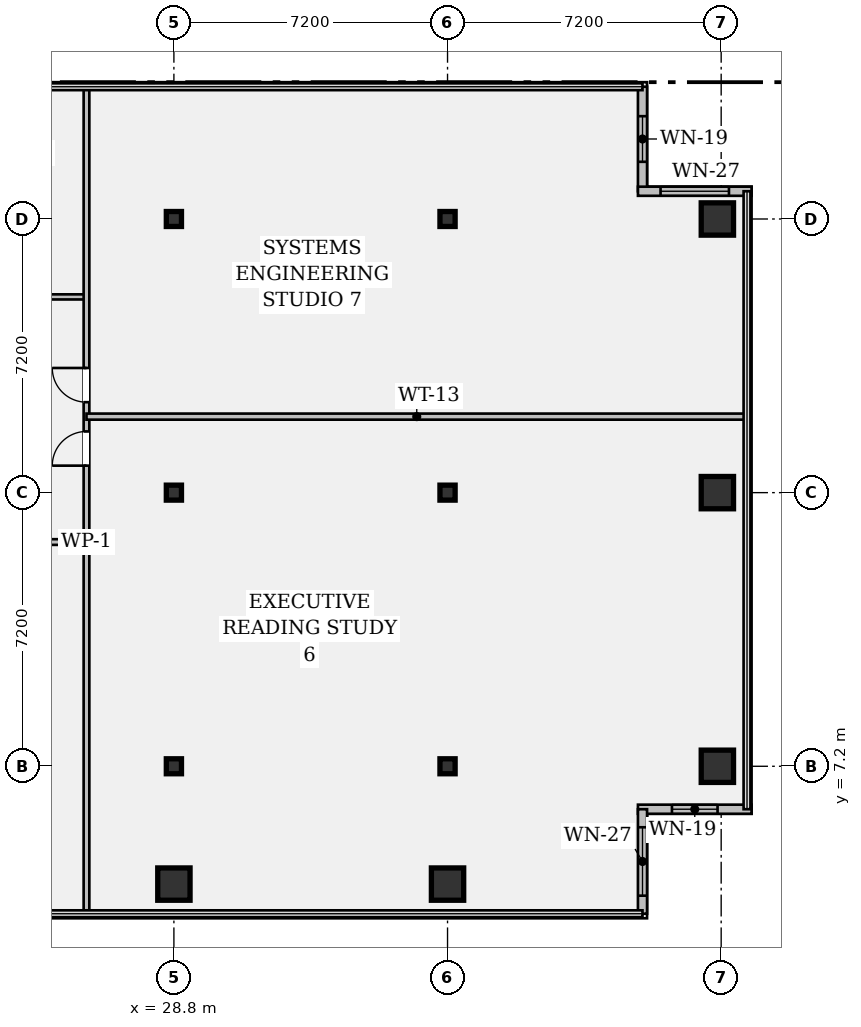
"""IFC4 building model, lengths in metres.
Left out: names, types, materials, properties, quantities, classifications, styles, units other than length and angle.
Written with IfcOpenShell. Run it as: python <this file> out.ifc"""

import sys

from ifc_helpers import new_model, si_unit, direction, frame, frame_2d, origin, origin_2d, place, context, subcontext, project, spatial, rectangle, hollow_rectangle, i_section, extrude, element, fill, save


model = new_model("IFC4")
c1 = context("Model", 3, precision=1e-05, world=origin(), true_north=direction((0.0, 1.0)))
c2 = subcontext(c1, "Body", "Model", "MODEL_VIEW")
j1 = project(units=[si_unit("LENGTHUNIT", "METRE"), si_unit("PLANEANGLEUNIT", "RADIAN")], contexts=[c1])
p1 = place(None, origin())
s1 = spatial("IfcSite", under=j1, at=p1, CompositionType="ELEMENT")
p2 = place(p1, origin())
s2 = spatial("IfcBuilding", under=s1, at=p2, CompositionType="ELEMENT")
p3 = place(p2, frame((0.0, 0.0, 176.75)))
s3 = spatial("IfcBuildingStorey", under=s2, at=p3, CompositionType="ELEMENT", Elevation=176.75)
p4 = place(p3, frame((28.8, 4.1, 0.0), z_axis=(0.0, 0.0, 1.0), x_axis=(1.0, 0.0, 0.0)))
e1 = element("IfcColumn", 1, at=p4, inside=s3, PredefinedType="COLUMN", context=c2, shape_type="SweptSolid", body=[
    extrude(hollow_rectangle(XDim=0.85, YDim=0.85, WallThickness=0.05, at=origin_2d()), origin(), (0.0, 0.0, 1.0), 3.24),
])
for number, where, z_axis, x_axis in (
    (2, (28.8, 7.2, 0.0), (0.0, 0.0, 1.0), (1.0, 0.0, 0.0)),
    (3, (28.8, 14.4, 0.0), (0.0, 0.0, 1.0), (1.0, 0.0, 0.0)),
    (4, (28.8, 21.6, 0.0), (0.0, 0.0, 1.0), (1.0, 0.0, 0.0)),
):
    element("IfcColumn", number, at=place(p3, frame(where, z_axis=z_axis, x_axis=x_axis)), inside=s3, PredefinedType="COLUMN", context=c2, shape_type="SweptSolid", body=[
        extrude(i_section(OverallWidth=0.399, OverallDepth=0.394, WebThickness=0.023, FlangeThickness=0.037, FilletRadius=0.018, at=origin_2d()), origin(), (0.0, 0.0, 1.0), 3.24),
    ])
p5 = place(p3, frame((36.0, 4.1, 0.0), z_axis=(0.0, 0.0, 1.0), x_axis=(1.0, 0.0, 0.0)))
e5 = element("IfcColumn", 5, at=p5, inside=s3, PredefinedType="COLUMN", context=c2, shape_type="SweptSolid", body=[
    extrude(hollow_rectangle(XDim=0.85, YDim=0.85, WallThickness=0.05, at=origin_2d()), origin(), (0.0, 0.0, 1.0), 3.24),
])
for number, where, z_axis, x_axis in (
    (6, (36.0, 7.2, 0.0), (0.0, 0.0, 1.0), (1.0, 0.0, 0.0)),
    (7, (36.0, 14.4, 0.0), (0.0, 0.0, 1.0), (1.0, 0.0, 0.0)),
    (8, (36.0, 21.6, 0.0), (0.0, 0.0, 1.0), (1.0, 0.0, 0.0)),
):
    element("IfcColumn", number, at=place(p3, frame(where, z_axis=z_axis, x_axis=x_axis)), inside=s3, PredefinedType="COLUMN", context=c2, shape_type="SweptSolid", body=[
        extrude(i_section(OverallWidth=0.399, OverallDepth=0.394, WebThickness=0.023, FlangeThickness=0.037, FilletRadius=0.018, at=origin_2d()), origin(), (0.0, 0.0, 1.0), 3.24),
    ])
for number, where, z_axis, x_axis in (
    (9, (43.1, 7.2, 0.0), (0.0, 0.0, 1.0), (1.0, 0.0, 0.0)),
    (10, (43.1, 14.4, 0.0), (0.0, 0.0, 1.0), (1.0, 0.0, 0.0)),
    (11, (43.1, 21.6, 0.0), (0.0, 0.0, 1.0), (1.0, 0.0, 0.0)),
):
    element("IfcColumn", number, at=place(p3, frame(where, z_axis=z_axis, x_axis=x_axis)), inside=s3, PredefinedType="COLUMN", context=c2, shape_type="SweptSolid", body=[
        extrude(hollow_rectangle(XDim=0.85, YDim=0.85, WallThickness=0.05, at=origin_2d()), origin(), (0.0, 0.0, 1.0), 3.24),
    ])
p6 = place(p3, frame((41.13, 25.08, 0.0), z_axis=(0.0, 0.0, 1.0), x_axis=(0.0, -1.0, 0.0)))
e12 = element("IfcWall", 12, at=p6, inside=s3, PredefinedType="STANDARD", context=c2, shape_type="SweptSolid", body=[
    extrude(rectangle(XDim=2.75, YDim=0.24, at=frame_2d((1.375, 0.0))), origin(), (0.0, 0.0, 1.0), 3.24),
])
p7 = place(p6, frame((0.775, 0.0, 0.95)))
e13 = element("IfcOpeningElement", 13, at=p7, cuts=e12, PredefinedType="OPENING", context=c2, shape_type="SweptSolid", body=[
    extrude(rectangle(XDim=1.2, YDim=1.8, at=frame_2d((0.6, 0.9))), frame((0.0, 0.132, 0.0), z_axis=(0.0, -1.0, 0.0), x_axis=(1.0, 0.0, 0.0)), (0.0, 0.0, 1.0), 0.264),
])
p8 = place(p3, frame((41.01, 22.33, 0.0), z_axis=(0.0, 0.0, 1.0), x_axis=(1.0, 0.0, 0.0)))
e14 = element("IfcWall", 14, at=p8, inside=s3, PredefinedType="STANDARD", context=c2, shape_type="SweptSolid", body=[
    extrude(rectangle(XDim=2.99, YDim=0.24, at=frame_2d((1.495, 0.0))), origin(), (0.0, 0.0, 1.0), 3.24),
])
p9 = place(p8, frame((0.595, 0.0, 0.95)))
e15 = element("IfcOpeningElement", 15, at=p9, cuts=e14, PredefinedType="OPENING", context=c2, shape_type="SweptSolid", body=[
    extrude(rectangle(XDim=1.8, YDim=1.35, at=frame_2d((0.9, 0.675))), frame((0.0, 0.132, 0.0), z_axis=(0.0, -1.0, 0.0), x_axis=(1.0, 0.0, 0.0)), (0.0, 0.0, 1.0), 0.264),
])
p10 = place(p3, frame((44.0, 6.07, 0.0), z_axis=(0.0, 0.0, 1.0), x_axis=(-1.0, 0.0, 0.0)))
e16 = element("IfcWall", 16, at=p10, inside=s3, PredefinedType="STANDARD", context=c2, shape_type="SweptSolid", body=[
    extrude(rectangle(XDim=2.99, YDim=0.24, at=frame_2d((1.495, 0.0))), origin(), (0.0, 0.0, 1.0), 3.24),
])
p11 = place(p10, frame((0.895, 0.0, 0.95)))
e17 = element("IfcOpeningElement", 17, at=p11, cuts=e16, PredefinedType="OPENING", context=c2, shape_type="SweptSolid", body=[
    extrude(rectangle(XDim=1.2, YDim=1.8, at=frame_2d((0.6, 0.9))), frame((0.0, 0.132, 0.0), z_axis=(0.0, -1.0, 0.0), x_axis=(1.0, 0.0, 0.0)), (0.0, 0.0, 1.0), 0.264),
])
p12 = place(p3, frame((41.13, 6.07, 0.0), z_axis=(0.0, 0.0, 1.0), x_axis=(0.0, -1.0, 0.0)))
e18 = element("IfcWall", 18, at=p12, inside=s3, PredefinedType="STANDARD", context=c2, shape_type="SweptSolid", body=[
    extrude(rectangle(XDim=2.75, YDim=0.24, at=frame_2d((1.375, 0.0))), origin(), (0.0, 0.0, 1.0), 3.24),
])
p13 = place(p12, frame((0.475, 0.0, 0.95)))
e19 = element("IfcOpeningElement", 19, at=p13, cuts=e18, PredefinedType="OPENING", context=c2, shape_type="SweptSolid", body=[
    extrude(rectangle(XDim=1.8, YDim=1.35, at=frame_2d((0.9, 0.675))), frame((0.0, 0.132, 0.0), z_axis=(0.0, -1.0, 0.0), x_axis=(1.0, 0.0, 0.0)), (0.0, 0.0, 1.0), 0.264),
])
p14 = place(p3, frame((24.55, 13.1, 0.0), z_axis=(0.0, 0.0, 1.0), x_axis=(1.0, 0.0, 0.0)))
e20 = element("IfcWall", 20, at=p14, inside=s3, PredefinedType="PARTITIONING", context=c2, shape_type="SweptSolid", body=[
    extrude(rectangle(XDim=1.95, YDim=0.15, at=frame_2d((0.975, 0.0))), origin(), (0.0, 0.0, 1.0), 2.808),
])
p15 = place(p3, frame((24.55, 19.55, 0.0), z_axis=(0.0, 0.0, 1.0), x_axis=(1.0, 0.0, 0.0)))
e21 = element("IfcWall", 21, at=p15, inside=s3, PredefinedType="PARTITIONING", context=c2, shape_type="SweptSolid", body=[
    extrude(rectangle(XDim=1.95, YDim=0.135, at=frame_2d((0.975, 0.0))), origin(), (0.0, 0.0, 1.0), 2.808),
])
p16 = place(p3, frame((26.5, 3.32, 0.0), z_axis=(0.0, 0.0, 1.0), x_axis=(0.0, 1.0, 0.0)))
e22 = element("IfcWall", 22, at=p16, inside=s3, PredefinedType="PARTITIONING", context=c2, shape_type="SweptSolid", body=[
    extrude(rectangle(XDim=21.76, YDim=0.15, at=frame_2d((10.88, 0.0))), origin(), (0.0, 0.0, 1.0), 2.603),
])
p17 = place(p16, frame((11.79, 0.0, 0.0)))
e23 = element("IfcOpeningElement", 23, at=p17, cuts=e22, PredefinedType="OPENING", context=c2, shape_type="SweptSolid", body=[
    extrude(rectangle(XDim=0.9, YDim=2.15, at=frame_2d((0.45, 1.075))), frame((0.0, 0.087, 0.0), z_axis=(0.0, -1.0, 0.0), x_axis=(1.0, 0.0, 0.0)), (0.0, 0.0, 1.0), 0.174),
])
p18 = place(p16, frame((13.46, 0.0, 0.0)))
e24 = element("IfcOpeningElement", 24, at=p18, cuts=e22, PredefinedType="OPENING", context=c2, shape_type="SweptSolid", body=[
    extrude(rectangle(XDim=0.9, YDim=2.15, at=frame_2d((0.45, 1.075))), frame((0.0, 0.087, 0.0), z_axis=(0.0, -1.0, 0.0), x_axis=(1.0, 0.0, 0.0)), (0.0, 0.0, 1.0), 0.174),
])
p19 = place(p3, frame((26.5, 16.4, 0.0), z_axis=(0.0, 0.0, 1.0), x_axis=(1.0, 0.0, 0.0)))
e25 = element("IfcWall", 25, at=p19, inside=s3, PredefinedType="PARTITIONING", context=c2, shape_type="SweptSolid", body=[
    extrude(rectangle(XDim=17.38, YDim=0.16, at=frame_2d((8.69, 0.0))), origin(), (0.0, 0.0, 1.0), 2.603),
])
p20 = place(p7, origin())
e26 = element("IfcWindow", 26, at=p20, inside=s3, PartitioningType="SINGLE_PANEL", PredefinedType="WINDOW", context=c2, shape_type="SweptSolid", body=[
    extrude(rectangle(XDim=1.2, YDim=1.8, at=frame_2d((0.6, 0.9))), frame((0.0, 0.03, 0.0), z_axis=(0.0, -1.0, 0.0), x_axis=(1.0, 0.0, 0.0)), (0.0, 0.0, 1.0), 0.06),
])
fill(e13, e26)
p21 = place(p9, origin())
e27 = element("IfcWindow", 27, at=p21, inside=s3, PartitioningType="SINGLE_PANEL", PredefinedType="WINDOW", context=c2, shape_type="SweptSolid", body=[
    extrude(rectangle(XDim=1.8, YDim=1.35, at=frame_2d((0.9, 0.675))), frame((0.0, 0.03, 0.0), z_axis=(0.0, -1.0, 0.0), x_axis=(1.0, 0.0, 0.0)), (0.0, 0.0, 1.0), 0.06),
])
fill(e15, e27)
p22 = place(p11, origin())
e28 = element("IfcWindow", 28, at=p22, inside=s3, PartitioningType="SINGLE_PANEL", PredefinedType="WINDOW", context=c2, shape_type="SweptSolid", body=[
    extrude(rectangle(XDim=1.2, YDim=1.8, at=frame_2d((0.6, 0.9))), frame((0.0, 0.03, 0.0), z_axis=(0.0, -1.0, 0.0), x_axis=(1.0, 0.0, 0.0)), (0.0, 0.0, 1.0), 0.06),
])
fill(e17, e28)
p23 = place(p13, origin())
e29 = element("IfcWindow", 29, at=p23, inside=s3, PartitioningType="SINGLE_PANEL", PredefinedType="WINDOW", context=c2, shape_type="SweptSolid", body=[
    extrude(rectangle(XDim=1.8, YDim=1.35, at=frame_2d((0.9, 0.675))), frame((0.0, 0.03, 0.0), z_axis=(0.0, -1.0, 0.0), x_axis=(1.0, 0.0, 0.0)), (0.0, 0.0, 1.0), 0.06),
])
fill(e19, e29)
p24 = place(p17, origin())
e30 = element("IfcDoor", 30, at=p24, inside=s3, OperationType="SINGLE_SWING_LEFT", PredefinedType="DOOR", context=c2, shape_type="SweptSolid", body=[
    extrude(rectangle(XDim=0.9, YDim=2.15, at=frame_2d((0.45, 1.075))), frame((0.0, 0.025, 0.0), z_axis=(0.0, -1.0, 0.0), x_axis=(1.0, 0.0, 0.0)), (0.0, 0.0, 1.0), 0.05),
])
fill(e23, e30)
p25 = place(p18, origin())
e31 = element("IfcDoor", 31, at=p25, inside=s3, OperationType="SINGLE_SWING_RIGHT", PredefinedType="DOOR", context=c2, shape_type="SweptSolid", body=[
    extrude(rectangle(XDim=0.9, YDim=2.15, at=frame_2d((0.45, 1.075))), frame((0.0, 0.025, 0.0), z_axis=(0.0, -1.0, 0.0), x_axis=(1.0, 0.0, 0.0)), (0.0, 0.0, 1.0), 0.05),
])
fill(e24, e31)
save(model, sys.argv[1])
